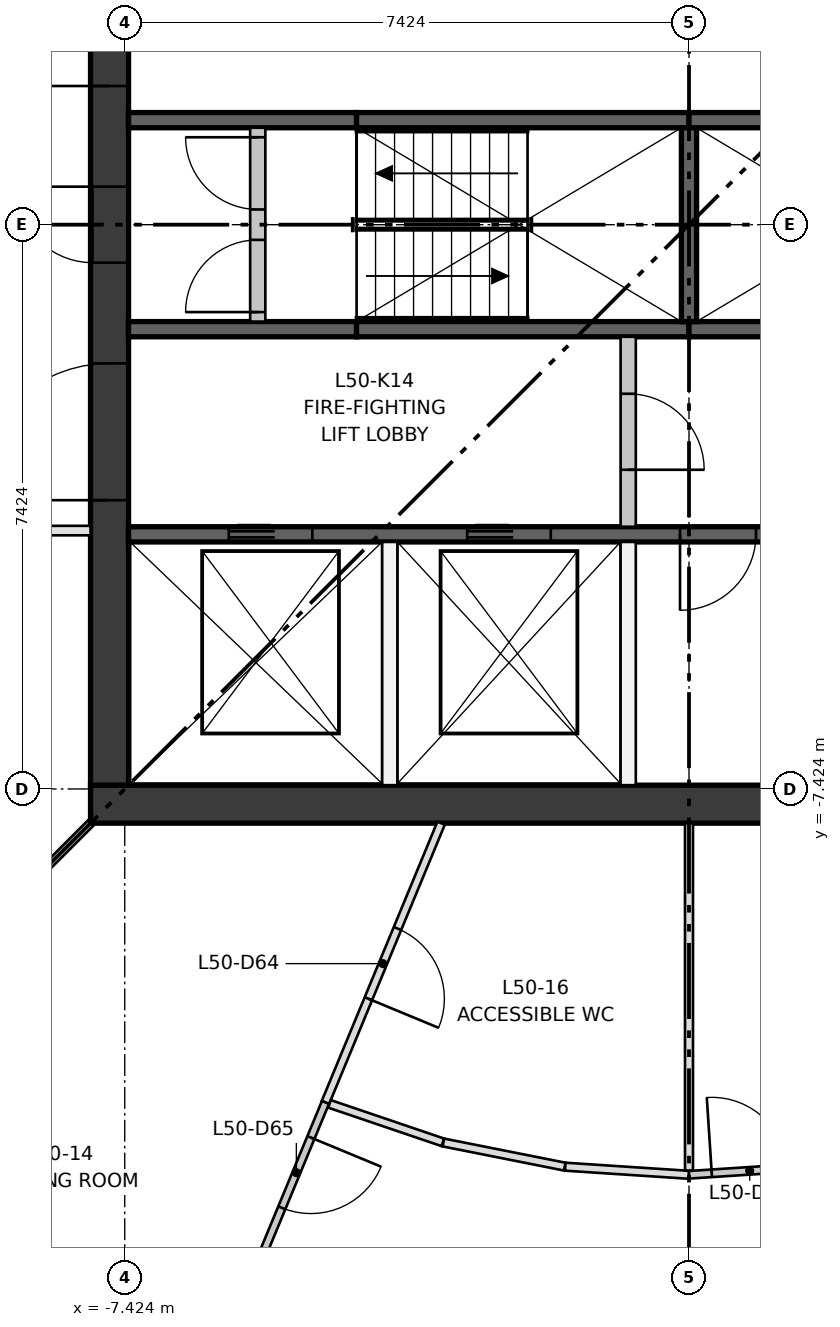
"""IFC4 building model, lengths in metres.
Left out: names, types, materials, properties, quantities, classifications, styles, units other than length and angle.
Written with IfcOpenShell. Run it as: python <this file> out.ifc"""

import sys

from ifc_helpers import new_model, si_unit, direction, frame, frame_2d, origin, place, context, subcontext, project, spatial, rectangle, extrude, element, fill, save


model = new_model("IFC4")
c1 = context("Model", 3, precision=1e-05, world=origin(), true_north=direction((0.0, 1.0)))
c2 = subcontext(c1, "Body", "Model", "MODEL_VIEW")
j1 = project(units=[si_unit("LENGTHUNIT", "METRE"), si_unit("PLANEANGLEUNIT", "RADIAN")], contexts=[c1])
p1 = place(None, origin())
s1 = spatial("IfcSite", under=j1, at=p1, CompositionType="ELEMENT")
p2 = place(p1, origin())
s2 = spatial("IfcBuilding", under=s1, at=p2, CompositionType="ELEMENT")
p3 = place(p2, frame((0.0, 0.0, 187.65)))
s3 = spatial("IfcBuildingStorey", under=s2, at=p3, CompositionType="ELEMENT", Elevation=187.65)
p4 = place(p3, frame((-7.874, -7.624, 0.0), z_axis=(0.0, 0.0, 1.0), x_axis=(1.0, 0.0, 0.0)))
e1 = element("IfcWall", 1, at=p4, inside=s3, PredefinedType="SHEAR", context=c2, shape_type="SweptSolid", body=[
    extrude(rectangle(XDim=15.748, YDim=0.5, at=frame_2d((7.874, 0.0))), origin(), (0.0, 0.0, 1.0), 3.35),
])
p5 = place(p3, frame((-7.624, -7.374, 0.0), z_axis=(0.0, 0.0, 1.0), x_axis=(0.0, 1.0, 0.0)))
e2 = element("IfcWall", 2, at=p5, inside=s3, PredefinedType="SHEAR", context=c2, shape_type="SweptSolid", body=[
    extrude(rectangle(XDim=14.748, YDim=0.5, at=frame_2d((7.374, 0.0))), origin(), (0.0, 0.0, 1.0), 3.35),
])
p6 = place(p5, frame((6.874, 0.0, 0.0)))
e3 = element("IfcOpeningElement", 3, at=p6, cuts=e2, PredefinedType="OPENING", context=c2, shape_type="SweptSolid", body=[
    extrude(rectangle(XDim=1.0, YDim=2.1, at=frame_2d((0.5, 1.05))), frame((0.0, 0.26, 0.0), z_axis=(0.0, -1.0, 0.0), x_axis=(1.0, 0.0, 0.0)), (0.0, 0.0, 1.0), 0.52),
])
p7 = place(p5, frame((3.75, 0.0, 0.0)))
e4 = element("IfcOpeningElement", 4, at=p7, cuts=e2, PredefinedType="OPENING", context=c2, shape_type="SweptSolid", body=[
    extrude(rectangle(XDim=1.8, YDim=2.1, at=frame_2d((0.9, 1.05))), frame((0.0, 0.26, 0.0), z_axis=(0.0, -1.0, 0.0), x_axis=(1.0, 0.0, 0.0)), (0.0, 0.0, 1.0), 0.52),
])
p8 = place(p5, frame((9.198, 0.0, 0.0)))
e5 = element("IfcOpeningElement", 5, at=p8, cuts=e2, PredefinedType="OPENING", context=c2, shape_type="SweptSolid", body=[
    extrude(rectangle(XDim=1.8, YDim=2.1, at=frame_2d((0.9, 1.05))), frame((0.0, 0.26, 0.0), z_axis=(0.0, -1.0, 0.0), x_axis=(1.0, 0.0, 0.0)), (0.0, 0.0, 1.0), 0.52),
])
p9 = place(p3, frame((-7.374, -4.074, 0.0), z_axis=(0.0, 0.0, 1.0), x_axis=(1.0, 0.0, 0.0)))
e6 = element("IfcWall", 6, at=p9, inside=s3, PredefinedType="SHEAR", context=c2, shape_type="SweptSolid", body=[
    extrude(rectangle(XDim=14.748, YDim=0.2, at=frame_2d((7.374, 0.0))), origin(), (0.0, 0.0, 1.0), 3.0),
])
p10 = place(p9, frame((1.319, 0.0, 0.0)))
e7 = element("IfcOpeningElement", 7, at=p10, cuts=e6, PredefinedType="OPENING", context=c2, shape_type="SweptSolid", body=[
    extrude(rectangle(XDim=1.1, YDim=2.1, at=frame_2d((0.55, 1.05))), frame((0.0, 0.11, 0.0), z_axis=(0.0, -1.0, 0.0), x_axis=(1.0, 0.0, 0.0)), (0.0, 0.0, 1.0), 0.22),
])
p11 = place(p9, frame((4.456, 0.0, 0.0)))
e8 = element("IfcOpeningElement", 8, at=p11, cuts=e6, PredefinedType="OPENING", context=c2, shape_type="SweptSolid", body=[
    extrude(rectangle(XDim=1.1, YDim=2.1, at=frame_2d((0.55, 1.05))), frame((0.0, 0.11, 0.0), z_axis=(0.0, -1.0, 0.0), x_axis=(1.0, 0.0, 0.0)), (0.0, 0.0, 1.0), 0.22),
])
p12 = place(p9, frame((7.256, 0.0, 0.0)))
e9 = element("IfcOpeningElement", 9, at=p12, cuts=e6, PredefinedType="OPENING", context=c2, shape_type="SweptSolid", body=[
    extrude(rectangle(XDim=1.0, YDim=2.1, at=frame_2d((0.5, 1.05))), frame((0.0, 0.11, 0.0), z_axis=(0.0, -1.0, 0.0), x_axis=(1.0, 0.0, 0.0)), (0.0, 0.0, 1.0), 0.22),
])
p13 = place(p9, frame((9.275, 0.0, 0.0)))
e10 = element("IfcOpeningElement", 10, at=p13, cuts=e6, PredefinedType="OPENING", context=c2, shape_type="SweptSolid", body=[
    extrude(rectangle(XDim=1.0, YDim=2.1, at=frame_2d((0.5, 1.05))), frame((0.0, 0.11, 0.0), z_axis=(0.0, -1.0, 0.0), x_axis=(1.0, 0.0, 0.0)), (0.0, 0.0, 1.0), 0.22),
])
p14 = place(p9, frame((10.95, 0.0, 0.0)))
e11 = element("IfcOpeningElement", 11, at=p14, cuts=e6, PredefinedType="OPENING", context=c2, shape_type="SweptSolid", body=[
    extrude(rectangle(XDim=1.0, YDim=2.1, at=frame_2d((0.5, 1.05))), frame((0.0, 0.11, 0.0), z_axis=(0.0, -1.0, 0.0), x_axis=(1.0, 0.0, 0.0)), (0.0, 0.0, 1.0), 0.22),
])
p15 = place(p9, frame((13.068, 0.0, 0.0)))
e12 = element("IfcOpeningElement", 12, at=p15, cuts=e6, PredefinedType="OPENING", context=c2, shape_type="SweptSolid", body=[
    extrude(rectangle(XDim=1.0, YDim=2.1, at=frame_2d((0.5, 1.05))), frame((0.0, 0.11, 0.0), z_axis=(0.0, -1.0, 0.0), x_axis=(1.0, 0.0, 0.0)), (0.0, 0.0, 1.0), 0.22),
])
p16 = place(p3, frame((-7.374, -1.375, 0.0), z_axis=(0.0, 0.0, 1.0), x_axis=(1.0, 0.0, 0.0)))
e13 = element("IfcWall", 13, at=p16, inside=s3, PredefinedType="SHEAR", context=c2, shape_type="SweptSolid", body=[
    extrude(rectangle(XDim=3.0, YDim=0.2, at=frame_2d((1.5, 0.0))), origin(), (0.0, 0.0, 1.0), 3.0),
])
for number, where, z_axis, x_axis in (
    (14, (-4.374, -1.375, 0.0), (0.0, 0.0, 1.0), (1.0, 0.0, 0.0)),
    (15, (0.0, -1.375, 0.0), (0.0, 0.0, 1.0), (1.0, 0.0, 0.0)),
):
    element("IfcWall", number, at=place(p3, frame(where, z_axis=z_axis, x_axis=x_axis)), inside=s3, PredefinedType="SHEAR", context=c2, shape_type="SweptSolid", body=[
        extrude(rectangle(XDim=4.374, YDim=0.2, at=frame_2d((2.187, 0.0))), origin(), (0.0, 0.0, 1.0), 3.0),
    ])
p17 = place(p3, frame((-7.374, 1.375, 0.0), z_axis=(0.0, 0.0, 1.0), x_axis=(1.0, 0.0, 0.0)))
e16 = element("IfcWall", 16, at=p17, inside=s3, PredefinedType="SHEAR", context=c2, shape_type="SweptSolid", body=[
    extrude(rectangle(XDim=3.0, YDim=0.2, at=frame_2d((1.5, 0.0))), origin(), (0.0, 0.0, 1.0), 3.0),
])
for number, where, z_axis, x_axis in (
    (17, (-4.374, 1.375, 0.0), (0.0, 0.0, 1.0), (1.0, 0.0, 0.0)),
    (18, (0.0, 1.375, 0.0), (0.0, 0.0, 1.0), (1.0, 0.0, 0.0)),
):
    element("IfcWall", number, at=place(p3, frame(where, z_axis=z_axis, x_axis=x_axis)), inside=s3, PredefinedType="SHEAR", context=c2, shape_type="SweptSolid", body=[
        extrude(rectangle(XDim=4.374, YDim=0.2, at=frame_2d((2.187, 0.0))), origin(), (0.0, 0.0, 1.0), 3.0),
    ])
p18 = place(p3, frame((0.0, -1.275, 0.0), z_axis=(0.0, 0.0, 1.0), x_axis=(0.0, 1.0, 0.0)))
e19 = element("IfcWall", 19, at=p18, inside=s3, PredefinedType="SHEAR", context=c2, shape_type="SweptSolid", body=[
    extrude(rectangle(XDim=2.55, YDim=0.2, at=frame_2d((1.275, 0.0))), origin(), (0.0, 0.0, 1.0), 3.0),
])
for number, where, z_axis, x_axis in (
    (20, (-3.937, -7.374, 0.0), (0.0, 0.0, 1.0), (0.0, 1.0, 0.0)),
    (21, (-0.8, -7.374, 0.0), (0.0, 0.0, 1.0), (0.0, 1.0, 0.0)),
):
    element("IfcWall", number, at=place(p3, frame(where, z_axis=z_axis, x_axis=x_axis)), inside=s3, PredefinedType="PARTITIONING", context=c2, shape_type="SweptSolid", body=[
        extrude(rectangle(XDim=3.2, YDim=0.2, at=frame_2d((1.6, 0.0))), origin(), (0.0, 0.0, 1.0), 3.0),
    ])
p19 = place(p3, frame((-0.8, -3.974, 0.0), z_axis=(0.0, 0.0, 1.0), x_axis=(0.0, 1.0, 0.0)))
e22 = element("IfcWall", 22, at=p19, inside=s3, PredefinedType="PARTITIONING", context=c2, shape_type="SweptSolid", body=[
    extrude(rectangle(XDim=2.499, YDim=0.2, at=frame_2d((1.25, 0.0))), origin(), (0.0, 0.0, 1.0), 3.0),
])
p20 = place(p19, frame((0.75, 0.0, 0.0)))
e23 = element("IfcOpeningElement", 23, at=p20, cuts=e22, PredefinedType="OPENING", context=c2, shape_type="SweptSolid", body=[
    extrude(rectangle(XDim=1.0, YDim=2.1, at=frame_2d((0.5, 1.05))), frame((0.0, 0.11, 0.0), z_axis=(0.0, -1.0, 0.0), x_axis=(1.0, 0.0, 0.0)), (0.0, 0.0, 1.0), 0.22),
])
p21 = place(p3, frame((-5.674, -1.275, 0.0), z_axis=(0.0, 0.0, 1.0), x_axis=(0.0, 1.0, 0.0)))
e24 = element("IfcWall", 24, at=p21, inside=s3, PredefinedType="PARTITIONING", context=c2, shape_type="SweptSolid", body=[
    extrude(rectangle(XDim=2.55, YDim=0.2, at=frame_2d((1.275, 0.0))), origin(), (0.0, 0.0, 1.0), 3.0),
])
p22 = place(p21, frame((0.125, 0.0, 0.0)))
e25 = element("IfcOpeningElement", 25, at=p22, cuts=e24, PredefinedType="OPENING", context=c2, shape_type="SweptSolid", body=[
    extrude(rectangle(XDim=0.95, YDim=2.1, at=frame_2d((0.475, 1.05))), frame((0.0, 0.11, 0.0), z_axis=(0.0, -1.0, 0.0), x_axis=(1.0, 0.0, 0.0)), (0.0, 0.0, 1.0), 0.22),
])
p23 = place(p21, frame((1.475, 0.0, 0.0)))
e26 = element("IfcOpeningElement", 26, at=p23, cuts=e24, PredefinedType="OPENING", context=c2, shape_type="SweptSolid", body=[
    extrude(rectangle(XDim=0.95, YDim=2.1, at=frame_2d((0.475, 1.05))), frame((0.0, 0.11, 0.0), z_axis=(0.0, -1.0, 0.0), x_axis=(1.0, 0.0, 0.0)), (0.0, 0.0, 1.0), 0.22),
])
p24 = place(p3, frame((-7.874, -4.024, 0.0), z_axis=(0.0, 0.0, 1.0), x_axis=(-1.0, 0.0, 0.0)))
e27 = element("IfcWall", 27, at=p24, inside=s3, PredefinedType="PARTITIONING", context=c2, shape_type="SweptSolid", body=[
    extrude(rectangle(XDim=3.213, YDim=0.125, at=frame_2d((1.606, 0.0))), origin(), (0.0, 0.0, 1.0), 3.0),
])
p25 = place(p24, frame((1.1, 0.0, 0.0)))
e28 = element("IfcOpeningElement", 28, at=p25, cuts=e27, PredefinedType="OPENING", context=c2, shape_type="SweptSolid", body=[
    extrude(rectangle(XDim=1.0, YDim=2.1, at=frame_2d((0.5, 1.05))), frame((0.0, 0.073, 0.0), z_axis=(0.0, -1.0, 0.0), x_axis=(1.0, 0.0, 0.0)), (0.0, 0.0, 1.0), 0.145),
])
p26 = place(p3, frame((-7.874, -7.874, 0.0), z_axis=(0.0, 0.0, 1.0), x_axis=(-0.707106781187, -0.707106781187, 0.0)))
e29 = element("IfcWall", 29, at=p26, inside=s3, PredefinedType="PARTITIONING", context=c2, shape_type="SweptSolid", body=[
    extrude(rectangle(XDim=5.834, YDim=0.1, at=frame_2d((2.917, 0.0))), origin(), (0.0, 0.0, 1.0), 3.0),
])
p27 = place(p26, frame((1.8, 0.0, 0.0)))
e30 = element("IfcOpeningElement", 30, at=p27, cuts=e29, PredefinedType="OPENING", context=c2, shape_type="SweptSolid", body=[
    extrude(rectangle(XDim=1.0, YDim=2.1, at=frame_2d((0.5, 1.05))), frame((0.0, 0.06, 0.0), z_axis=(0.0, -1.0, 0.0), x_axis=(1.0, 0.0, 0.0)), (0.0, 0.0, 1.0), 0.12),
])
p28 = place(p3, frame((-3.261, -7.874, 0.0), z_axis=(0.0, 0.0, 1.0), x_axis=(-0.382666229821, -0.923886657851, 0.0)))
e31 = element("IfcWall", 31, at=p28, inside=s3, PredefinedType="PARTITIONING", context=c2, shape_type="SweptSolid", body=[
    extrude(rectangle(XDim=3.977, YDim=0.105, at=frame_2d((1.989, 0.0))), origin(), (0.0, 0.0, 1.0), 3.0),
])
p29 = place(p28, frame((1.5, 0.0, 0.0)))
e32 = element("IfcOpeningElement", 32, at=p29, cuts=e31, PredefinedType="OPENING", context=c2, shape_type="SweptSolid", body=[
    extrude(rectangle(XDim=1.0, YDim=2.1, at=frame_2d((0.5, 1.05))), frame((0.0, 0.062, 0.0), z_axis=(0.0, -1.0, 0.0), x_axis=(1.0, 0.0, 0.0)), (0.0, 0.0, 1.0), 0.125),
])
p30 = place(p3, frame((-4.783, -11.549, 0.0), z_axis=(0.0, 0.0, 1.0), x_axis=(-0.382710359347, -0.92386837853, 0.0)))
e33 = element("IfcWall", 33, at=p30, inside=s3, PredefinedType="PARTITIONING", context=c2, shape_type="SweptSolid", body=[
    extrude(rectangle(XDim=4.47, YDim=0.1, at=frame_2d((2.235, 0.0))), origin(), (0.0, 0.0, 1.0), 3.0),
])
p31 = place(p30, frame((0.5, 0.0, 0.0)))
e34 = element("IfcOpeningElement", 34, at=p31, cuts=e33, PredefinedType="OPENING", context=c2, shape_type="SweptSolid", body=[
    extrude(rectangle(XDim=1.0, YDim=2.1, at=frame_2d((0.5, 1.05))), frame((0.0, 0.06, 0.0), z_axis=(0.0, -1.0, 0.0), x_axis=(1.0, 0.0, 0.0)), (0.0, 0.0, 1.0), 0.12),
])
p32 = place(p3, frame((-3.239, -12.073, 0.0), z_axis=(0.0, 0.0, 1.0), x_axis=(-0.946902062217, 0.321522136982, 0.0)))
e35 = element("IfcWall", 35, at=p32, inside=s3, PredefinedType="PARTITIONING", context=c2, shape_type="SweptSolid", body=[
    extrude(rectangle(XDim=1.576, YDim=0.105, at=frame_2d((0.788, 0.0))), origin(), (0.0, 0.0, 1.0), 3.0),
])
p33 = place(p3, frame((-1.635, -12.392, 0.0), z_axis=(0.0, 0.0, 1.0), x_axis=(-0.980782034379, 0.195106640172, 0.0)))
e36 = element("IfcWall", 36, at=p33, inside=s3, PredefinedType="PARTITIONING", context=c2, shape_type="SweptSolid", body=[
    extrude(rectangle(XDim=1.628, YDim=0.105, at=frame_2d((0.814, 0.0))), origin(), (0.0, 0.0, 1.0), 3.0),
])
p34 = place(p3, frame((0.0, -12.5, 0.0), z_axis=(0.0, 0.0, 1.0), x_axis=(-0.997859990953, 0.065386837014, 0.0)))
e37 = element("IfcWall", 37, at=p34, inside=s3, PredefinedType="PARTITIONING", context=c2, shape_type="SweptSolid", body=[
    extrude(rectangle(XDim=1.632, YDim=0.105, at=frame_2d((0.816, 0.0))), origin(), (0.0, 0.0, 1.0), 3.0),
])
p35 = place(p3, frame((0.0, -7.874, 0.0), z_axis=(0.0, 0.0, 1.0), x_axis=(0.0, -1.0, 0.0)))
e38 = element("IfcWall", 38, at=p35, inside=s3, PredefinedType="PARTITIONING", context=c2, shape_type="SweptSolid", body=[
    extrude(rectangle(XDim=4.57, YDim=0.105, at=frame_2d((2.285, 0.0))), origin(), (0.0, 0.0, 1.0), 3.0),
])
p36 = place(p3, frame((0.0, -12.5, 0.0), z_axis=(0.0, 0.0, 1.0), x_axis=(0.997860630529, 0.065377075793, 0.0)))
e39 = element("IfcWall", 39, at=p36, inside=s3, PredefinedType="PARTITIONING", context=c2, shape_type="SweptSolid", body=[
    extrude(rectangle(XDim=1.632, YDim=0.1, at=frame_2d((0.816, 0.0))), origin(), (0.0, 0.0, 1.0), 3.0),
])
p37 = place(p36, frame((0.3, 0.0, 0.0)))
e40 = element("IfcOpeningElement", 40, at=p37, cuts=e39, PredefinedType="OPENING", context=c2, shape_type="SweptSolid", body=[
    extrude(rectangle(XDim=1.0, YDim=2.1, at=frame_2d((0.5, 1.05))), frame((0.0, 0.06, 0.0), z_axis=(0.0, -1.0, 0.0), x_axis=(1.0, 0.0, 0.0)), (0.0, 0.0, 1.0), 0.12),
])
p38 = place(p10, origin())
e41 = element("IfcDoor", 41, at=p38, inside=s3, OperationType="DOUBLE_DOOR_SLIDING", PredefinedType="DOOR", context=c2, shape_type="SweptSolid", body=[
    extrude(rectangle(XDim=1.1, YDim=2.1, at=frame_2d((0.55, 1.05))), frame((0.0, 0.025, 0.0), z_axis=(0.0, -1.0, 0.0), x_axis=(1.0, 0.0, 0.0)), (0.0, 0.0, 1.0), 0.05),
])
fill(e7, e41)
p39 = place(p11, origin())
e42 = element("IfcDoor", 42, at=p39, inside=s3, OperationType="DOUBLE_DOOR_SLIDING", PredefinedType="DOOR", context=c2, shape_type="SweptSolid", body=[
    extrude(rectangle(XDim=1.1, YDim=2.1, at=frame_2d((0.55, 1.05))), frame((0.0, 0.025, 0.0), z_axis=(0.0, -1.0, 0.0), x_axis=(1.0, 0.0, 0.0)), (0.0, 0.0, 1.0), 0.05),
])
fill(e8, e42)
p40 = place(p22, origin())
e43 = element("IfcDoor", 43, at=p40, inside=s3, OperationType="SINGLE_SWING_LEFT", PredefinedType="DOOR", context=c2, shape_type="SweptSolid", body=[
    extrude(rectangle(XDim=0.95, YDim=2.1, at=frame_2d((0.475, 1.05))), frame((0.0, 0.025, 0.0), z_axis=(0.0, -1.0, 0.0), x_axis=(1.0, 0.0, 0.0)), (0.0, 0.0, 1.0), 0.05),
])
fill(e25, e43)
p41 = place(p23, origin())
e44 = element("IfcDoor", 44, at=p41, inside=s3, OperationType="SINGLE_SWING_RIGHT", PredefinedType="DOOR", context=c2, shape_type="SweptSolid", body=[
    extrude(rectangle(XDim=0.95, YDim=2.1, at=frame_2d((0.475, 1.05))), frame((0.0, 0.025, 0.0), z_axis=(0.0, -1.0, 0.0), x_axis=(1.0, 0.0, 0.0)), (0.0, 0.0, 1.0), 0.05),
])
fill(e26, e44)
p42 = place(p20, frame((1.0, 0.0, 0.0), z_axis=(0.0, 0.0, 1.0), x_axis=(-1.0, 0.0, 0.0)))
e45 = element("IfcDoor", 45, at=p42, inside=s3, OperationType="SINGLE_SWING_LEFT", PredefinedType="DOOR", context=c2, shape_type="SweptSolid", body=[
    extrude(rectangle(XDim=1.0, YDim=2.1, at=frame_2d((0.5, 1.05))), frame((0.0, 0.025, 0.0), z_axis=(0.0, -1.0, 0.0), x_axis=(1.0, 0.0, 0.0)), (0.0, 0.0, 1.0), 0.05),
])
fill(e23, e45)
p43 = place(p12, frame((1.0, 0.0, 0.0), z_axis=(0.0, 0.0, 1.0), x_axis=(-1.0, 0.0, 0.0)))
e46 = element("IfcDoor", 46, at=p43, inside=s3, OperationType="SINGLE_SWING_LEFT", PredefinedType="DOOR", context=c2, shape_type="SweptSolid", body=[
    extrude(rectangle(XDim=1.0, YDim=2.1, at=frame_2d((0.5, 1.05))), frame((0.0, 0.025, 0.0), z_axis=(0.0, -1.0, 0.0), x_axis=(1.0, 0.0, 0.0)), (0.0, 0.0, 1.0), 0.05),
])
fill(e9, e46)
p44 = place(p6, origin())
e47 = element("IfcDoor", 47, at=p44, inside=s3, OperationType="SINGLE_SWING_RIGHT", PredefinedType="DOOR", context=c2, shape_type="SweptSolid", body=[
    extrude(rectangle(XDim=1.0, YDim=2.1, at=frame_2d((0.5, 1.05))), frame((0.0, 0.25, 0.0), z_axis=(0.0, -1.0, 0.0), x_axis=(1.0, 0.0, 0.0)), (0.0, 0.0, 1.0), 0.05),
])
fill(e3, e47)
p45 = place(p7, origin())
e48 = element("IfcDoor", 48, at=p45, inside=s3, OperationType="DOUBLE_DOOR_SINGLE_SWING", PredefinedType="DOOR", context=c2, shape_type="SweptSolid", body=[
    extrude(rectangle(XDim=1.8, YDim=2.1, at=frame_2d((0.9, 1.05))), frame((0.0, 0.025, 0.0), z_axis=(0.0, -1.0, 0.0), x_axis=(1.0, 0.0, 0.0)), (0.0, 0.0, 1.0), 0.05),
])
fill(e4, e48)
p46 = place(p8, origin())
e49 = element("IfcDoor", 49, at=p46, inside=s3, OperationType="DOUBLE_DOOR_SINGLE_SWING", PredefinedType="DOOR", context=c2, shape_type="SweptSolid", body=[
    extrude(rectangle(XDim=1.8, YDim=2.1, at=frame_2d((0.9, 1.05))), frame((0.0, 0.025, 0.0), z_axis=(0.0, -1.0, 0.0), x_axis=(1.0, 0.0, 0.0)), (0.0, 0.0, 1.0), 0.05),
])
fill(e5, e49)
p47 = place(p29, origin())
e50 = element("IfcDoor", 50, at=p47, inside=s3, OperationType="SINGLE_SWING_RIGHT", PredefinedType="DOOR", context=c2, shape_type="SweptSolid", body=[
    extrude(rectangle(XDim=1.0, YDim=2.1, at=frame_2d((0.5, 1.05))), frame((0.0, 0.025, 0.0), z_axis=(0.0, -1.0, 0.0), x_axis=(1.0, 0.0, 0.0)), (0.0, 0.0, 1.0), 0.05),
])
fill(e32, e50)
p48 = place(p31, origin())
e51 = element("IfcDoor", 51, at=p48, inside=s3, OperationType="SINGLE_SWING_LEFT", PredefinedType="DOOR", context=c2, shape_type="SweptSolid", body=[
    extrude(rectangle(XDim=1.0, YDim=2.1, at=frame_2d((0.5, 1.05))), frame((0.0, 0.025, 0.0), z_axis=(0.0, -1.0, 0.0), x_axis=(1.0, 0.0, 0.0)), (0.0, 0.0, 1.0), 0.05),
])
fill(e34, e51)
p49 = place(p37, origin())
e52 = element("IfcDoor", 52, at=p49, inside=s3, OperationType="SINGLE_SWING_LEFT", PredefinedType="DOOR", context=c2, shape_type="SweptSolid", body=[
    extrude(rectangle(XDim=1.0, YDim=2.1, at=frame_2d((0.5, 1.05))), frame((0.0, 0.025, 0.0), z_axis=(0.0, -1.0, 0.0), x_axis=(1.0, 0.0, 0.0)), (0.0, 0.0, 1.0), 0.05),
])
fill(e40, e52)
save(model, sys.argv[1])
